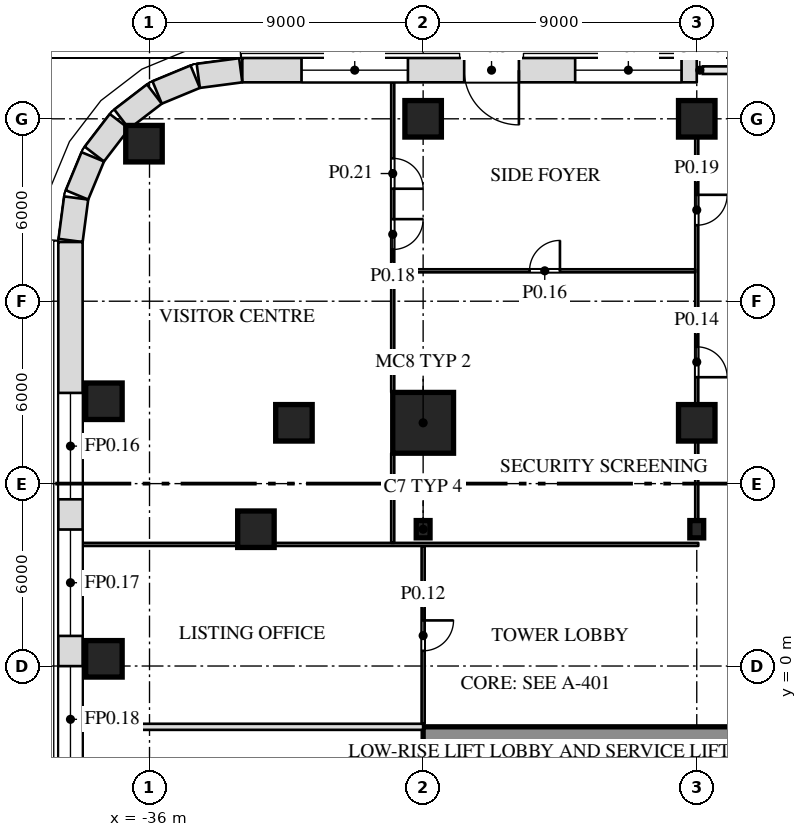
"""IFC4 building model, lengths in metres.
Left out: names, types, materials, properties, quantities, classifications, styles, units other than length and angle.
Written with IfcOpenShell. Run it as: python <this file> out.ifc"""

import sys

from ifc_helpers import new_model, si_unit, direction, frame, frame_2d, origin, origin_2d, place, context, subcontext, project, spatial, rectangle, i_section, extrude, element, fill, save


model = new_model("IFC4")
c1 = context("Model", 3, precision=1e-05, world=origin(), true_north=direction((0.0, 1.0)))
c2 = subcontext(c1, "Body", "Model", "MODEL_VIEW")
j1 = project(units=[si_unit("LENGTHUNIT", "METRE"), si_unit("PLANEANGLEUNIT", "RADIAN")], contexts=[c1])
p1 = place(None, origin())
s1 = spatial("IfcSite", under=j1, at=p1, CompositionType="ELEMENT")
p2 = place(p1, origin())
s2 = spatial("IfcBuilding", under=s1, at=p2, CompositionType="ELEMENT")
p3 = place(p2, origin())
s3 = spatial("IfcBuildingStorey", under=s2, at=p3, CompositionType="ELEMENT", Elevation=0.0)
for number, where, z_axis, x_axis in (
    (1, (-37.5, 0.236, 0.0), (0.0, 0.0, 1.0), (1.0, 0.0, 0.0)),
    (2, (-32.5, 4.5, 0.0), (0.0, 0.0, 1.0), (1.0, 0.0, 0.0)),
):
    element("IfcColumn", number, at=place(p3, frame(where, z_axis=z_axis, x_axis=x_axis)), inside=s3, PredefinedType="COLUMN", context=c2, shape_type="SweptSolid", body=[
        extrude(rectangle(XDim=1.2, YDim=1.2, at=origin_2d()), origin(), (0.0, 0.0, 1.0), 9.0),
    ])
for number, where, z_axis, x_axis in (
    (3, (-27.0, 4.5, 0.0), (0.0, 0.0, 1.0), (1.0, 0.0, 0.0)),
    (4, (-18.0, 4.5, 0.0), (0.0, 0.0, 1.0), (1.0, 0.0, 0.0)),
):
    element("IfcColumn", number, at=place(p3, frame(where, z_axis=z_axis, x_axis=x_axis)), inside=s3, PredefinedType="COLUMN", context=c2, shape_type="SweptSolid", body=[
        extrude(i_section(OverallWidth=0.455, OverallDepth=0.569, WebThickness=0.078, FlangeThickness=0.125, at=origin_2d()), origin(), (0.0, 0.0, 1.0), 9.0),
    ])
p4 = place(p3, frame((-31.25, 8.0, 0.0), z_axis=(0.0, 0.0, 1.0), x_axis=(1.0, 0.0, 0.0)))
e5 = element("IfcColumn", 5, at=p4, inside=s3, PredefinedType="COLUMN", context=c2, shape_type="SweptSolid", body=[
    extrude(rectangle(XDim=1.2, YDim=1.2, at=origin_2d()), origin(), (0.0, 0.0, 1.0), 9.0),
])
p5 = place(p3, frame((-27.0, 8.0, 0.0), z_axis=(0.0, 0.0, 1.0), x_axis=(1.0, 0.0, 0.0)))
e6 = element("IfcColumn", 6, at=p5, inside=s3, PredefinedType="COLUMN", context=c2, shape_type="SweptSolid", body=[
    extrude(rectangle(XDim=2.0, YDim=2.0, at=origin_2d()), origin(), (0.0, 0.0, 1.0), 9.0),
])
for number, where, z_axis, x_axis in (
    (7, (-18.0, 8.0, 0.0), (0.0, 0.0, 1.0), (1.0, 0.0, 0.0)),
    (8, (-37.5, 8.709, 0.0), (0.0, 0.0, 1.0), (1.0, 0.0, 0.0)),
    (9, (-36.182, 17.182, 0.0), (0.0, 0.0, 1.0), (1.0, 0.0, 0.0)),
    (10, (-27.0, 18.0, 0.0), (0.0, 0.0, 1.0), (1.0, 0.0, 0.0)),
    (11, (-18.0, 18.0, 0.0), (0.0, 0.0, 1.0), (1.0, 0.0, 0.0)),
):
    element("IfcColumn", number, at=place(p3, frame(where, z_axis=z_axis, x_axis=x_axis)), inside=s3, PredefinedType="COLUMN", context=c2, shape_type="SweptSolid", body=[
        extrude(rectangle(XDim=1.2, YDim=1.2, at=origin_2d()), origin(), (0.0, 0.0, 1.0), 9.0),
    ])
p6 = place(p3, frame((-27.0, -2.6, 0.0), z_axis=(0.0, 0.0, 1.0), x_axis=(1.0, 0.0, 0.0)))
e12 = element("IfcWall", 12, at=p6, inside=s3, PredefinedType="SHEAR", context=c2, shape_type="SweptSolid", body=[
    extrude(rectangle(XDim=54.0, YDim=1.2, at=frame_2d((27.0, 0.0))), origin(), (0.0, 0.0, 1.0), 8.7),
])
p7 = place(p6, frame((15.15, 0.0, 0.0)))
e13 = element("IfcOpeningElement", 13, at=p7, cuts=e12, PredefinedType="OPENING", context=c2, shape_type="SweptSolid", body=[
    extrude(rectangle(XDim=2.4, YDim=2.1, at=frame_2d((1.2, 1.05))), frame((0.0, 0.612, 0.0), z_axis=(0.0, -1.0, 0.0), x_axis=(1.0, 0.0, 0.0)), (0.0, 0.0, 1.0), 1.224),
])
p8 = place(p6, frame((36.45, 0.0, 0.0)))
e14 = element("IfcOpeningElement", 14, at=p8, cuts=e12, PredefinedType="OPENING", context=c2, shape_type="SweptSolid", body=[
    extrude(rectangle(XDim=2.4, YDim=2.1, at=frame_2d((1.2, 1.05))), frame((0.0, 0.612, 0.0), z_axis=(0.0, -1.0, 0.0), x_axis=(1.0, 0.0, 0.0)), (0.0, 0.0, 1.0), 1.224),
])
p9 = place(p3, frame((-38.2, -2.0, 0.0), z_axis=(0.0, 0.0, 1.0), x_axis=(1.0, 0.0, 0.0)))
e15 = element("IfcWall", 15, at=p9, inside=s3, PredefinedType="PARTITIONING", context=c2, shape_type="SweptSolid", body=[
    extrude(rectangle(XDim=11.2, YDim=0.2, at=frame_2d((5.6, 0.0))), origin(), (0.0, 0.0, 1.0), 8.7),
])
p10 = place(p3, frame((-27.0, -1.9, 0.0), z_axis=(0.0, 0.0, 1.0), x_axis=(0.0, 1.0, 0.0)))
e16 = element("IfcWall", 16, at=p10, inside=s3, PredefinedType="PARTITIONING", context=c2, shape_type="SweptSolid", body=[
    extrude(rectangle(XDim=5.85, YDim=0.1, at=frame_2d((2.925, 0.0))), origin(), (0.0, 0.0, 1.0), 8.088),
])
p11 = place(p10, frame((2.4, 0.0, 0.0)))
e17 = element("IfcOpeningElement", 17, at=p11, cuts=e16, PredefinedType="OPENING", context=c2, shape_type="SweptSolid", body=[
    extrude(rectangle(XDim=1.0, YDim=2.1, at=frame_2d((0.5, 1.05))), frame((0.0, 0.062, 0.0), z_axis=(0.0, -1.0, 0.0), x_axis=(1.0, 0.0, 0.0)), (0.0, 0.0, 1.0), 0.124),
])
p12 = place(p3, frame((-38.2, 4.0, 0.0), z_axis=(0.0, 0.0, 1.0), x_axis=(1.0, 0.0, 0.0)))
e18 = element("IfcWall", 18, at=p12, inside=s3, PredefinedType="PARTITIONING", context=c2, shape_type="SweptSolid", body=[
    extrude(rectangle(XDim=5.1, YDim=0.1, at=frame_2d((2.55, 0.0))), origin(), (0.0, 0.0, 1.0), 8.7),
])
p13 = place(p3, frame((-31.9, 4.0, 0.0), z_axis=(0.0, 0.0, 1.0), x_axis=(1.0, 0.0, 0.0)))
e19 = element("IfcWall", 19, at=p13, inside=s3, PredefinedType="PARTITIONING", context=c2, shape_type="SweptSolid", body=[
    extrude(rectangle(XDim=13.95, YDim=0.1, at=frame_2d((6.975, 0.0))), origin(), (0.0, 0.0, 1.0), 8.7),
])
p14 = place(p3, frame((-28.0, 4.05, 0.0), z_axis=(0.0, 0.0, 1.0), x_axis=(0.0, 1.0, 0.0)))
e20 = element("IfcWall", 20, at=p14, inside=s3, PredefinedType="PARTITIONING", context=c2, shape_type="SweptSolid", body=[
    extrude(rectangle(XDim=2.95, YDim=0.1, at=frame_2d((1.475, 0.0))), origin(), (0.0, 0.0, 1.0), 8.7),
])
p15 = place(p3, frame((-28.0, 9.0, 0.0), z_axis=(0.0, 0.0, 1.0), x_axis=(0.0, 1.0, 0.0)))
e21 = element("IfcWall", 21, at=p15, inside=s3, PredefinedType="PARTITIONING", context=c2, shape_type="SweptSolid", body=[
    extrude(rectangle(XDim=10.2, YDim=0.1, at=frame_2d((5.1, 0.0))), origin(), (0.0, 0.0, 1.0), 8.7),
])
p16 = place(p15, frame((4.7, 0.0, 0.0)))
e22 = element("IfcOpeningElement", 22, at=p16, cuts=e21, PredefinedType="OPENING", context=c2, shape_type="SweptSolid", body=[
    extrude(rectangle(XDim=1.0, YDim=2.1, at=frame_2d((0.5, 1.05))), frame((0.0, 0.062, 0.0), z_axis=(0.0, -1.0, 0.0), x_axis=(1.0, 0.0, 0.0)), (0.0, 0.0, 1.0), 0.124),
])
p17 = place(p15, frame((6.7, 0.0, 0.0)))
e23 = element("IfcOpeningElement", 23, at=p17, cuts=e21, PredefinedType="OPENING", context=c2, shape_type="SweptSolid", body=[
    extrude(rectangle(XDim=1.0, YDim=2.1, at=frame_2d((0.5, 1.05))), frame((0.0, 0.062, 0.0), z_axis=(0.0, -1.0, 0.0), x_axis=(1.0, 0.0, 0.0)), (0.0, 0.0, 1.0), 0.124),
])
p18 = place(p3, frame((-18.0, 4.784, 0.0), z_axis=(0.0, 0.0, 1.0), x_axis=(0.0, 1.0, 0.0)))
e24 = element("IfcWall", 24, at=p18, inside=s3, PredefinedType="PARTITIONING", context=c2, shape_type="SweptSolid", body=[
    extrude(rectangle(XDim=2.615, YDim=0.1, at=frame_2d((1.308, 0.0))), origin(), (0.0, 0.0, 1.0), 8.088),
])
p19 = place(p3, frame((-18.0, 8.6, 0.0), z_axis=(0.0, 0.0, 1.0), x_axis=(0.0, 1.0, 0.0)))
e25 = element("IfcWall", 25, at=p19, inside=s3, PredefinedType="PARTITIONING", context=c2, shape_type="SweptSolid", body=[
    extrude(rectangle(XDim=8.8, YDim=0.1, at=frame_2d((4.4, 0.0))), origin(), (0.0, 0.0, 1.0), 8.088),
])
p20 = place(p19, frame((0.9, 0.0, 0.0)))
e26 = element("IfcOpeningElement", 26, at=p20, cuts=e25, PredefinedType="OPENING", context=c2, shape_type="SweptSolid", body=[
    extrude(rectangle(XDim=1.0, YDim=2.1, at=frame_2d((0.5, 1.05))), frame((0.0, 0.062, 0.0), z_axis=(0.0, -1.0, 0.0), x_axis=(1.0, 0.0, 0.0)), (0.0, 0.0, 1.0), 0.124),
])
p21 = place(p19, frame((5.9, 0.0, 0.0)))
e27 = element("IfcOpeningElement", 27, at=p21, cuts=e25, PredefinedType="OPENING", context=c2, shape_type="SweptSolid", body=[
    extrude(rectangle(XDim=1.0, YDim=2.1, at=frame_2d((0.5, 1.05))), frame((0.0, 0.062, 0.0), z_axis=(0.0, -1.0, 0.0), x_axis=(1.0, 0.0, 0.0)), (0.0, 0.0, 1.0), 0.124),
])
p22 = place(p3, frame((-27.95, 13.0, 0.0), z_axis=(0.0, 0.0, 1.0), x_axis=(1.0, 0.0, 0.0)))
e28 = element("IfcWall", 28, at=p22, inside=s3, PredefinedType="PARTITIONING", context=c2, shape_type="SweptSolid", body=[
    extrude(rectangle(XDim=9.9, YDim=0.1, at=frame_2d((4.95, 0.0))), origin(), (0.0, 0.0, 1.0), 8.7),
])
p23 = place(p22, frame((4.45, 0.0, 0.0)))
e29 = element("IfcOpeningElement", 29, at=p23, cuts=e28, PredefinedType="OPENING", context=c2, shape_type="SweptSolid", body=[
    extrude(rectangle(XDim=1.0, YDim=2.1, at=frame_2d((0.5, 1.05))), frame((0.0, 0.062, 0.0), z_axis=(0.0, -1.0, 0.0), x_axis=(1.0, 0.0, 0.0)), (0.0, 0.0, 1.0), 0.124),
])
p24 = place(p3, frame((-18.0, 19.6, 0.0), z_axis=(0.0, 0.0, 1.0), x_axis=(-1.0, 0.0, 0.0)))
e30 = element("IfcWall", 30, at=p24, inside=s3, PredefinedType="SOLIDWALL", context=c2, shape_type="SweptSolid", body=[
    extrude(rectangle(XDim=14.948, YDim=0.8, at=frame_2d((7.474, 0.0))), origin(), (0.0, 0.0, 1.0), 8.7),
])
p25 = place(p24, frame((0.5, 0.0, 1.0)))
e31 = element("IfcOpeningElement", 31, at=p25, cuts=e30, PredefinedType="OPENING", context=c2, shape_type="SweptSolid", body=[
    extrude(rectangle(XDim=3.5, YDim=5.5, at=frame_2d((1.75, 2.75))), frame((0.0, 0.412, 0.0), z_axis=(0.0, -1.0, 0.0), x_axis=(1.0, 0.0, 0.0)), (0.0, 0.0, 1.0), 0.824),
])
p26 = place(p24, frame((9.5, 0.0, 1.0)))
e32 = element("IfcOpeningElement", 32, at=p26, cuts=e30, PredefinedType="OPENING", context=c2, shape_type="SweptSolid", body=[
    extrude(rectangle(XDim=3.5, YDim=5.5, at=frame_2d((1.75, 2.75))), frame((0.0, 0.412, 0.0), z_axis=(0.0, -1.0, 0.0), x_axis=(1.0, 0.0, 0.0)), (0.0, 0.0, 1.0), 0.824),
])
p27 = place(p24, frame((5.85, 0.0, 0.0)))
e33 = element("IfcOpeningElement", 33, at=p27, cuts=e30, PredefinedType="OPENING", context=c2, shape_type="SweptSolid", body=[
    extrude(rectangle(XDim=1.8, YDim=2.4, at=frame_2d((0.9, 1.2))), frame((0.0, 0.412, 0.0), z_axis=(0.0, -1.0, 0.0), x_axis=(1.0, 0.0, 0.0)), (0.0, 0.0, 1.0), 0.824),
])
p28 = place(p3, frame((-33.0, 19.597, 0.0), z_axis=(0.0, 0.0, 1.0), x_axis=(-0.99144603414, -0.130517283865, 0.0)))
e34 = element("IfcWall", 34, at=p28, inside=s3, PredefinedType="SOLIDWALL", context=c2, shape_type="SweptSolid", body=[
    extrude(rectangle(XDim=1.408, YDim=0.8, at=frame_2d((0.704, 0.0))), origin(), (0.0, 0.0, 1.0), 8.7),
])
p29 = place(p3, frame((-34.497, 19.386, 0.0), z_axis=(0.0, 0.0, 1.0), x_axis=(-0.923847774587, -0.38276009378, 0.0)))
e35 = element("IfcWall", 35, at=p29, inside=s3, PredefinedType="SOLIDWALL", context=c2, shape_type="SweptSolid", body=[
    extrude(rectangle(XDim=1.355, YDim=0.8, at=frame_2d((0.678, 0.0))), origin(), (0.0, 0.0, 1.0), 8.7),
])
for number, where, z_axis, x_axis in (
    (36, (-35.84, 18.815, 0.0), (0.0, 0.0, 1.0), (-0.793, -0.609, 0.0)),
    (37, (-36.989, 17.916, 0.0), (0.0, 0.0, 1.0), (-0.609, -0.793, 0.0)),
):
    element("IfcWall", number, at=place(p3, frame(where, z_axis=z_axis, x_axis=x_axis)), inside=s3, PredefinedType="SOLIDWALL", context=c2, shape_type="SweptSolid", body=[
        extrude(rectangle(XDim=1.356, YDim=0.8, at=frame_2d((0.678, 0.0))), origin(), (0.0, 0.0, 1.0), 8.7),
    ])
p30 = place(p3, frame((-37.867, 16.75, 0.0), z_axis=(0.0, 0.0, 1.0), x_axis=(-0.38276009378, -0.923847774587, 0.0)))
e38 = element("IfcWall", 38, at=p30, inside=s3, PredefinedType="SOLIDWALL", context=c2, shape_type="SweptSolid", body=[
    extrude(rectangle(XDim=1.355, YDim=0.8, at=frame_2d((0.678, 0.0))), origin(), (0.0, 0.0, 1.0), 8.7),
])
p31 = place(p3, frame((-38.413, 15.396, 0.0), z_axis=(0.0, 0.0, 1.0), x_axis=(-0.130517283865, -0.99144603414, 0.0)))
e39 = element("IfcWall", 39, at=p31, inside=s3, PredefinedType="SOLIDWALL", context=c2, shape_type="SweptSolid", body=[
    extrude(rectangle(XDim=1.408, YDim=0.8, at=frame_2d((0.704, 0.0))), origin(), (0.0, 0.0, 1.0), 8.7),
])
p32 = place(p3, frame((-38.6, 13.948, 0.0), z_axis=(0.0, 0.0, 1.0), x_axis=(0.0, -1.0, 0.0)))
e40 = element("IfcWall", 40, at=p32, inside=s3, PredefinedType="SOLIDWALL", context=c2, shape_type="SweptSolid", body=[
    extrude(rectangle(XDim=35.895, YDim=0.8, at=frame_2d((17.948, 0.0))), origin(), (0.0, 0.0, 1.0), 8.7),
])
p33 = place(p32, frame((4.964, 0.0, 1.0)))
e41 = element("IfcOpeningElement", 41, at=p33, cuts=e40, PredefinedType="OPENING", context=c2, shape_type="SweptSolid", body=[
    extrude(rectangle(XDim=3.5, YDim=5.5, at=frame_2d((1.75, 2.75))), frame((0.0, 0.412, 0.0), z_axis=(0.0, -1.0, 0.0), x_axis=(1.0, 0.0, 0.0)), (0.0, 0.0, 1.0), 0.824),
])
p34 = place(p32, frame((9.458, 0.0, 1.0)))
e42 = element("IfcOpeningElement", 42, at=p34, cuts=e40, PredefinedType="OPENING", context=c2, shape_type="SweptSolid", body=[
    extrude(rectangle(XDim=3.5, YDim=5.5, at=frame_2d((1.75, 2.75))), frame((0.0, 0.412, 0.0), z_axis=(0.0, -1.0, 0.0), x_axis=(1.0, 0.0, 0.0)), (0.0, 0.0, 1.0), 0.824),
])
p35 = place(p32, frame((13.951, 0.0, 1.0)))
e43 = element("IfcOpeningElement", 43, at=p35, cuts=e40, PredefinedType="OPENING", context=c2, shape_type="SweptSolid", body=[
    extrude(rectangle(XDim=3.5, YDim=5.5, at=frame_2d((1.75, 2.75))), frame((0.0, 0.412, 0.0), z_axis=(0.0, -1.0, 0.0), x_axis=(1.0, 0.0, 0.0)), (0.0, 0.0, 1.0), 0.824),
])
p36 = place(p32, frame((22.938, 0.0, 1.0)))
e44 = element("IfcOpeningElement", 44, at=p36, cuts=e40, PredefinedType="OPENING", context=c2, shape_type="SweptSolid", body=[
    extrude(rectangle(XDim=3.5, YDim=5.5, at=frame_2d((1.75, 2.75))), frame((0.0, 0.412, 0.0), z_axis=(0.0, -1.0, 0.0), x_axis=(1.0, 0.0, 0.0)), (0.0, 0.0, 1.0), 0.824),
])
p37 = place(p32, frame((27.431, 0.0, 1.0)))
e45 = element("IfcOpeningElement", 45, at=p37, cuts=e40, PredefinedType="OPENING", context=c2, shape_type="SweptSolid", body=[
    extrude(rectangle(XDim=3.5, YDim=5.5, at=frame_2d((1.75, 2.75))), frame((0.0, 0.412, 0.0), z_axis=(0.0, -1.0, 0.0), x_axis=(1.0, 0.0, 0.0)), (0.0, 0.0, 1.0), 0.824),
])
p38 = place(p32, frame((19.294, 0.0, 0.0)))
e46 = element("IfcOpeningElement", 46, at=p38, cuts=e40, PredefinedType="OPENING", context=c2, shape_type="SweptSolid", body=[
    extrude(rectangle(XDim=1.8, YDim=2.4, at=frame_2d((0.9, 1.2))), frame((0.0, 0.412, 0.0), z_axis=(0.0, -1.0, 0.0), x_axis=(1.0, 0.0, 0.0)), (0.0, 0.0, 1.0), 0.824),
])
p39 = place(p11, origin())
e47 = element("IfcDoor", 47, at=p39, inside=s3, OperationType="SINGLE_SWING_LEFT", PredefinedType="DOOR", context=c2, shape_type="SweptSolid", body=[
    extrude(rectangle(XDim=1.0, YDim=2.1, at=frame_2d((0.5, 1.05))), frame((0.0, 0.025, 0.0), z_axis=(0.0, -1.0, 0.0), x_axis=(1.0, 0.0, 0.0)), (0.0, 0.0, 1.0), 0.05),
])
fill(e17, e47)
p40 = place(p20, origin())
e48 = element("IfcDoor", 48, at=p40, inside=s3, OperationType="SINGLE_SWING_RIGHT", PredefinedType="DOOR", context=c2, shape_type="SweptSolid", body=[
    extrude(rectangle(XDim=1.0, YDim=2.1, at=frame_2d((0.5, 1.05))), frame((0.0, 0.025, 0.0), z_axis=(0.0, -1.0, 0.0), x_axis=(1.0, 0.0, 0.0)), (0.0, 0.0, 1.0), 0.05),
])
fill(e26, e48)
p41 = place(p23, origin())
e49 = element("IfcDoor", 49, at=p41, inside=s3, OperationType="SINGLE_SWING_RIGHT", PredefinedType="DOOR", context=c2, shape_type="SweptSolid", body=[
    extrude(rectangle(XDim=1.0, YDim=2.1, at=frame_2d((0.5, 1.05))), frame((0.0, 0.025, 0.0), z_axis=(0.0, -1.0, 0.0), x_axis=(1.0, 0.0, 0.0)), (0.0, 0.0, 1.0), 0.05),
])
fill(e29, e49)
p42 = place(p16, origin())
e50 = element("IfcDoor", 50, at=p42, inside=s3, OperationType="SINGLE_SWING_LEFT", PredefinedType="DOOR", context=c2, shape_type="SweptSolid", body=[
    extrude(rectangle(XDim=1.0, YDim=2.1, at=frame_2d((0.5, 1.05))), frame((0.0, 0.025, 0.0), z_axis=(0.0, -1.0, 0.0), x_axis=(1.0, 0.0, 0.0)), (0.0, 0.0, 1.0), 0.05),
])
fill(e22, e50)
p43 = place(p21, origin())
e51 = element("IfcDoor", 51, at=p43, inside=s3, OperationType="SINGLE_SWING_LEFT", PredefinedType="DOOR", context=c2, shape_type="SweptSolid", body=[
    extrude(rectangle(XDim=1.0, YDim=2.1, at=frame_2d((0.5, 1.05))), frame((0.0, 0.025, 0.0), z_axis=(0.0, -1.0, 0.0), x_axis=(1.0, 0.0, 0.0)), (0.0, 0.0, 1.0), 0.05),
])
fill(e27, e51)
p44 = place(p17, origin())
e52 = element("IfcDoor", 52, at=p44, inside=s3, OperationType="SINGLE_SWING_RIGHT", PredefinedType="DOOR", context=c2, shape_type="SweptSolid", body=[
    extrude(rectangle(XDim=1.0, YDim=2.1, at=frame_2d((0.5, 1.05))), frame((0.0, 0.025, 0.0), z_axis=(0.0, -1.0, 0.0), x_axis=(1.0, 0.0, 0.0)), (0.0, 0.0, 1.0), 0.05),
])
fill(e23, e52)
p45 = place(p25, origin())
e53 = element("IfcWindow", 53, at=p45, inside=s3, PartitioningType="SINGLE_PANEL", PredefinedType="WINDOW", context=c2, shape_type="SweptSolid", body=[
    extrude(rectangle(XDim=3.5, YDim=5.5, at=frame_2d((1.75, 2.75))), frame((0.0, 0.03, 0.0), z_axis=(0.0, -1.0, 0.0), x_axis=(1.0, 0.0, 0.0)), (0.0, 0.0, 1.0), 0.06),
])
fill(e31, e53)
p46 = place(p26, origin())
e54 = element("IfcWindow", 54, at=p46, inside=s3, PartitioningType="SINGLE_PANEL", PredefinedType="WINDOW", context=c2, shape_type="SweptSolid", body=[
    extrude(rectangle(XDim=3.5, YDim=5.5, at=frame_2d((1.75, 2.75))), frame((0.0, 0.03, 0.0), z_axis=(0.0, -1.0, 0.0), x_axis=(1.0, 0.0, 0.0)), (0.0, 0.0, 1.0), 0.06),
])
fill(e32, e54)
p47 = place(p33, origin())
e55 = element("IfcWindow", 55, at=p47, inside=s3, PartitioningType="SINGLE_PANEL", PredefinedType="WINDOW", context=c2, shape_type="SweptSolid", body=[
    extrude(rectangle(XDim=3.5, YDim=5.5, at=frame_2d((1.75, 2.75))), frame((0.0, 0.03, 0.0), z_axis=(0.0, -1.0, 0.0), x_axis=(1.0, 0.0, 0.0)), (0.0, 0.0, 1.0), 0.06),
])
fill(e41, e55)
p48 = place(p34, origin())
e56 = element("IfcWindow", 56, at=p48, inside=s3, PartitioningType="SINGLE_PANEL", PredefinedType="WINDOW", context=c2, shape_type="SweptSolid", body=[
    extrude(rectangle(XDim=3.5, YDim=5.5, at=frame_2d((1.75, 2.75))), frame((0.0, 0.03, 0.0), z_axis=(0.0, -1.0, 0.0), x_axis=(1.0, 0.0, 0.0)), (0.0, 0.0, 1.0), 0.06),
])
fill(e42, e56)
p49 = place(p35, origin())
e57 = element("IfcWindow", 57, at=p49, inside=s3, PartitioningType="SINGLE_PANEL", PredefinedType="WINDOW", context=c2, shape_type="SweptSolid", body=[
    extrude(rectangle(XDim=3.5, YDim=5.5, at=frame_2d((1.75, 2.75))), frame((0.0, 0.03, 0.0), z_axis=(0.0, -1.0, 0.0), x_axis=(1.0, 0.0, 0.0)), (0.0, 0.0, 1.0), 0.06),
])
fill(e43, e57)
p50 = place(p27, frame((1.8, 0.0, 0.0), z_axis=(0.0, 0.0, 1.0), x_axis=(-1.0, 0.0, 0.0)))
e58 = element("IfcDoor", 58, at=p50, inside=s3, OperationType="DOUBLE_DOOR_SINGLE_SWING", PredefinedType="DOOR", context=c2, shape_type="SweptSolid", body=[
    extrude(rectangle(XDim=1.8, YDim=2.4, at=frame_2d((0.9, 1.2))), frame((0.0, 0.025, 0.0), z_axis=(0.0, -1.0, 0.0), x_axis=(1.0, 0.0, 0.0)), (0.0, 0.0, 1.0), 0.05),
])
fill(e33, e58)
save(model, sys.argv[1])
